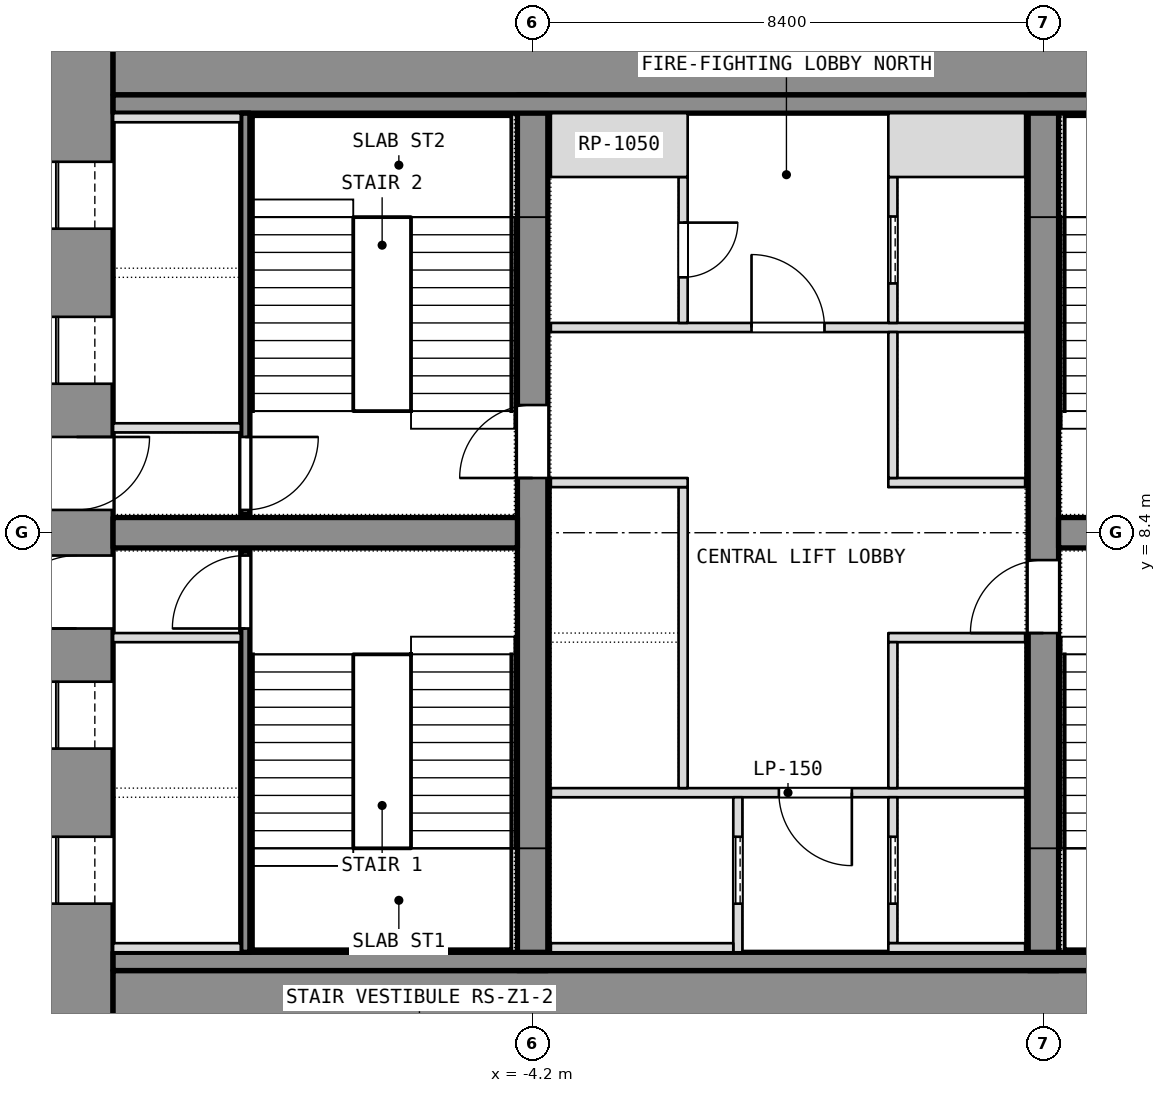
"""IFC4 building model, lengths in metres.
Left out: names, types, materials, properties, quantities, classifications, styles, units other than length and angle.
Written with IfcOpenShell. Run it as: python <this file> out.ifc"""

import sys

from ifc_helpers import new_model, si_unit, direction, frame, frame_2d, origin, place, context, subcontext, project, spatial, rectangle, extrude, element, fill, save


model = new_model("IFC4")
c1 = context("Model", 3, precision=1e-05, world=origin(), true_north=direction((0.0, 1.0)))
c2 = subcontext(c1, "Body", "Model", "MODEL_VIEW")
j1 = project(units=[si_unit("LENGTHUNIT", "METRE"), si_unit("PLANEANGLEUNIT", "RADIAN")], contexts=[c1])
p1 = place(None, origin())
s1 = spatial("IfcSite", under=j1, at=p1, CompositionType="ELEMENT")
p2 = place(p1, origin())
s2 = spatial("IfcBuilding", under=s1, at=p2, CompositionType="ELEMENT")
p3 = place(p2, frame((0.0, 0.0, 79.7)))
s3 = spatial("IfcBuildingStorey", under=s2, at=p3, CompositionType="ELEMENT", Elevation=79.7)
p4 = place(p3, frame((-11.7, 0.0, 0.0), z_axis=(0.0, 0.0, 1.0), x_axis=(0.0, 1.0, 0.0)))
e1 = element("IfcWall", 1, at=p4, inside=s3, PredefinedType="SHEAR", context=c2, shape_type="SweptSolid", body=[
    extrude(rectangle(XDim=16.8, YDim=1.2, at=frame_2d((8.4, 0.0))), origin(), (0.0, 0.0, 1.0), 3.6),
])
p5 = place(p4, frame((2.3, 0.0, 0.0)))
e2 = element("IfcOpeningElement", 2, at=p5, cuts=e1, PredefinedType="OPENING", context=c2, shape_type="SweptSolid", body=[
    extrude(rectangle(XDim=1.1, YDim=2.1, at=frame_2d((0.55, 1.05))), frame((0.0, 0.6, 0.0), z_axis=(0.0, -1.0, 0.0), x_axis=(1.0, 0.0, 0.0)), (0.0, 0.0, 1.0), 1.2),
])
p6 = place(p4, frame((4.85, 0.0, 0.0)))
e3 = element("IfcOpeningElement", 3, at=p6, cuts=e1, PredefinedType="OPENING", context=c2, shape_type="SweptSolid", body=[
    extrude(rectangle(XDim=1.1, YDim=2.1, at=frame_2d((0.55, 1.05))), frame((0.0, 0.6, 0.0), z_axis=(0.0, -1.0, 0.0), x_axis=(1.0, 0.0, 0.0)), (0.0, 0.0, 1.0), 1.2),
])
p7 = place(p4, frame((6.825, 0.0, 0.0)))
e4 = element("IfcOpeningElement", 4, at=p7, cuts=e1, PredefinedType="OPENING", context=c2, shape_type="SweptSolid", body=[
    extrude(rectangle(XDim=1.2, YDim=2.1, at=frame_2d((0.6, 1.05))), frame((0.0, 0.6, 0.0), z_axis=(0.0, -1.0, 0.0), x_axis=(1.0, 0.0, 0.0)), (0.0, 0.0, 1.0), 1.2),
])
p8 = place(p4, frame((13.4, 0.0, 0.0)))
e5 = element("IfcOpeningElement", 5, at=p8, cuts=e1, PredefinedType="OPENING", context=c2, shape_type="SweptSolid", body=[
    extrude(rectangle(XDim=1.1, YDim=2.1, at=frame_2d((0.55, 1.05))), frame((0.0, 0.6, 0.0), z_axis=(0.0, -1.0, 0.0), x_axis=(1.0, 0.0, 0.0)), (0.0, 0.0, 1.0), 1.2),
])
p9 = place(p4, frame((10.85, 0.0, 0.0)))
e6 = element("IfcOpeningElement", 6, at=p9, cuts=e1, PredefinedType="OPENING", context=c2, shape_type="SweptSolid", body=[
    extrude(rectangle(XDim=1.1, YDim=2.1, at=frame_2d((0.55, 1.05))), frame((0.0, 0.6, 0.0), z_axis=(0.0, -1.0, 0.0), x_axis=(1.0, 0.0, 0.0)), (0.0, 0.0, 1.0), 1.2),
])
p10 = place(p4, frame((8.775, 0.0, 0.0)))
e7 = element("IfcOpeningElement", 7, at=p10, cuts=e1, PredefinedType="OPENING", context=c2, shape_type="SweptSolid", body=[
    extrude(rectangle(XDim=1.2, YDim=2.1, at=frame_2d((0.6, 1.05))), frame((0.0, 0.6, 0.0), z_axis=(0.0, -1.0, 0.0), x_axis=(1.0, 0.0, 0.0)), (0.0, 0.0, 1.0), 1.2),
])
for number, where, z_axis, x_axis in (
    (8, (-11.1, 0.6, 0.0), (0.0, 0.0, 1.0), (1.0, 0.0, 0.0)),
    (9, (-11.1, 16.2, 0.0), (0.0, 0.0, 1.0), (1.0, 0.0, 0.0)),
):
    element("IfcWall", number, at=place(p3, frame(where, z_axis=z_axis, x_axis=x_axis)), inside=s3, PredefinedType="SHEAR", context=c2, shape_type="SweptSolid", body=[
        extrude(rectangle(XDim=22.2, YDim=1.2, at=frame_2d((11.1, 0.0))), origin(), (0.0, 0.0, 1.0), 3.6),
    ])
p11 = place(p3, frame((-4.2, 1.2, 0.0), z_axis=(0.0, 0.0, 1.0), x_axis=(0.0, 1.0, 0.0)))
e10 = element("IfcWall", 10, at=p11, inside=s3, PredefinedType="SHEAR", context=c2, shape_type="SweptSolid", body=[
    extrude(rectangle(XDim=14.4, YDim=0.5, at=frame_2d((7.2, 0.0))), origin(), (0.0, 0.0, 1.0), 3.6),
])
p12 = place(p11, frame((8.1, 0.0, 0.0)))
e11 = element("IfcOpeningElement", 11, at=p12, cuts=e10, PredefinedType="OPENING", context=c2, shape_type="SweptSolid", body=[
    extrude(rectangle(XDim=1.2, YDim=2.1, at=frame_2d((0.6, 1.05))), frame((0.0, 0.25, 0.0), z_axis=(0.0, -1.0, 0.0), x_axis=(1.0, 0.0, 0.0)), (0.0, 0.0, 1.0), 0.5),
])
p13 = place(p3, frame((4.2, 1.2, 0.0), z_axis=(0.0, 0.0, 1.0), x_axis=(0.0, 1.0, 0.0)))
e12 = element("IfcWall", 12, at=p13, inside=s3, PredefinedType="SHEAR", context=c2, shape_type="SweptSolid", body=[
    extrude(rectangle(XDim=14.4, YDim=0.5, at=frame_2d((7.2, 0.0))), origin(), (0.0, 0.0, 1.0), 3.6),
])
p14 = place(p13, frame((5.55, 0.0, 0.0)))
e13 = element("IfcOpeningElement", 13, at=p14, cuts=e12, PredefinedType="OPENING", context=c2, shape_type="SweptSolid", body=[
    extrude(rectangle(XDim=1.2, YDim=2.1, at=frame_2d((0.6, 1.05))), frame((0.0, 0.25, 0.0), z_axis=(0.0, -1.0, 0.0), x_axis=(1.0, 0.0, 0.0)), (0.0, 0.0, 1.0), 0.5),
])
for number, where, z_axis, x_axis in (
    (14, (-11.1, 8.4, 0.0), (0.0, 0.0, 1.0), (1.0, 0.0, 0.0)),
    (15, (4.45, 8.4, 0.0), (0.0, 0.0, 1.0), (1.0, 0.0, 0.0)),
):
    element("IfcWall", number, at=place(p3, frame(where, z_axis=z_axis, x_axis=x_axis)), inside=s3, PredefinedType="SHEAR", context=c2, shape_type="SweptSolid", body=[
        extrude(rectangle(XDim=6.65, YDim=0.5, at=frame_2d((3.325, 0.0))), origin(), (0.0, 0.0, 1.0), 3.6),
    ])
for number, where, z_axis, x_axis in (
    (16, (-11.1, 1.35, 0.0), (0.0, 0.0, 1.0), (1.0, 0.0, 0.0)),
    (17, (-11.1, 15.45, 0.0), (0.0, 0.0, 1.0), (1.0, 0.0, 0.0)),
):
    element("IfcWall", number, at=place(p3, frame(where, z_axis=z_axis, x_axis=x_axis)), inside=s3, PredefinedType="PARTITIONING", context=c2, shape_type="SweptSolid", body=[
        extrude(rectangle(XDim=22.2, YDim=0.3, at=frame_2d((11.1, 0.0))), origin(), (0.0, 0.0, 1.0), 3.34),
    ])
p15 = place(p3, frame((-8.925, 1.5, 0.0), z_axis=(0.0, 0.0, 1.0), x_axis=(0.0, 1.0, 0.0)))
e18 = element("IfcWall", 18, at=p15, inside=s3, PredefinedType="SHEAR", context=c2, shape_type="SweptSolid", body=[
    extrude(rectangle(XDim=6.6, YDim=0.15, at=frame_2d((3.3, 0.0))), origin(), (0.0, 0.0, 1.0), 3.34),
])
p16 = place(p15, frame((5.325, 0.0, 0.0)))
e19 = element("IfcOpeningElement", 19, at=p16, cuts=e18, PredefinedType="OPENING", context=c2, shape_type="SweptSolid", body=[
    extrude(rectangle(XDim=1.2, YDim=2.1, at=frame_2d((0.6, 1.05))), frame((0.0, 0.075, 0.0), z_axis=(0.0, -1.0, 0.0), x_axis=(1.0, 0.0, 0.0)), (0.0, 0.0, 1.0), 0.15),
])
for number, where, z_axis, x_axis in (
    (20, (-11.1, 6.675, 0.0), (0.0, 0.0, 1.0), (1.0, 0.0, 0.0)),
    (21, (-11.1, 1.575, 0.0), (0.0, 0.0, 1.0), (1.0, 0.0, 0.0)),
):
    element("IfcWall", number, at=place(p3, frame(where, z_axis=z_axis, x_axis=x_axis)), inside=s3, PredefinedType="SHEAR", context=c2, shape_type="SweptSolid", body=[
        extrude(rectangle(XDim=2.1, YDim=0.15, at=frame_2d((1.05, 0.0))), origin(), (0.0, 0.0, 1.0), 3.6),
    ])
p17 = place(p3, frame((-8.925, 8.7, 0.0), z_axis=(0.0, 0.0, 1.0), x_axis=(0.0, 1.0, 0.0)))
e22 = element("IfcWall", 22, at=p17, inside=s3, PredefinedType="SHEAR", context=c2, shape_type="SweptSolid", body=[
    extrude(rectangle(XDim=6.6, YDim=0.15, at=frame_2d((3.3, 0.0))), origin(), (0.0, 0.0, 1.0), 3.34),
])
p18 = place(p17, frame((0.075, 0.0, 0.0)))
e23 = element("IfcOpeningElement", 23, at=p18, cuts=e22, PredefinedType="OPENING", context=c2, shape_type="SweptSolid", body=[
    extrude(rectangle(XDim=1.2, YDim=2.1, at=frame_2d((0.6, 1.05))), frame((0.0, 0.075, 0.0), z_axis=(0.0, -1.0, 0.0), x_axis=(1.0, 0.0, 0.0)), (0.0, 0.0, 1.0), 0.15),
])
for number, where, z_axis, x_axis in (
    (24, (-11.1, 10.125, 0.0), (0.0, 0.0, 1.0), (1.0, 0.0, 0.0)),
    (25, (-11.1, 15.225, 0.0), (0.0, 0.0, 1.0), (1.0, 0.0, 0.0)),
):
    element("IfcWall", number, at=place(p3, frame(where, z_axis=z_axis, x_axis=x_axis)), inside=s3, PredefinedType="SHEAR", context=c2, shape_type="SweptSolid", body=[
        extrude(rectangle(XDim=2.1, YDim=0.15, at=frame_2d((1.05, 0.0))), origin(), (0.0, 0.0, 1.0), 3.6),
    ])
p19 = place(p3, frame((-3.9, 4.125, 0.0), z_axis=(0.0, 0.0, 1.0), x_axis=(1.0, 0.0, 0.0)))
e26 = element("IfcWall", 26, at=p19, inside=s3, PredefinedType="PARTITIONING", context=c2, shape_type="SweptSolid", body=[
    extrude(rectangle(XDim=7.8, YDim=0.15, at=frame_2d((3.9, 0.0))), origin(), (0.0, 0.0, 1.0), 3.34),
])
p20 = place(p19, frame((3.75, 0.0, 0.0)))
e27 = element("IfcOpeningElement", 27, at=p20, cuts=e26, PredefinedType="OPENING", context=c2, shape_type="SweptSolid", body=[
    extrude(rectangle(XDim=1.2, YDim=2.1, at=frame_2d((0.6, 1.05))), frame((0.0, 0.075, 0.0), z_axis=(0.0, -1.0, 0.0), x_axis=(1.0, 0.0, 0.0)), (0.0, 0.0, 1.0), 0.15),
])
p21 = place(p3, frame((-3.9, 11.775, 0.0), z_axis=(0.0, 0.0, 1.0), x_axis=(1.0, 0.0, 0.0)))
e28 = element("IfcWall", 28, at=p21, inside=s3, PredefinedType="PARTITIONING", context=c2, shape_type="SweptSolid", body=[
    extrude(rectangle(XDim=7.8, YDim=0.15, at=frame_2d((3.9, 0.0))), origin(), (0.0, 0.0, 1.0), 3.34),
])
p22 = place(p21, frame((3.3, 0.0, 0.0)))
e29 = element("IfcOpeningElement", 29, at=p22, cuts=e28, PredefinedType="OPENING", context=c2, shape_type="SweptSolid", body=[
    extrude(rectangle(XDim=1.2, YDim=2.1, at=frame_2d((0.6, 1.05))), frame((0.0, 0.075, 0.0), z_axis=(0.0, -1.0, 0.0), x_axis=(1.0, 0.0, 0.0)), (0.0, 0.0, 1.0), 0.15),
])
p23 = place(p3, frame((-0.825, 1.5, 0.0), z_axis=(0.0, 0.0, 1.0), x_axis=(0.0, 1.0, 0.0)))
e30 = element("IfcWall", 30, at=p23, inside=s3, PredefinedType="SHEAR", context=c2, shape_type="SweptSolid", body=[
    extrude(rectangle(XDim=2.55, YDim=0.15, at=frame_2d((1.275, 0.0))), origin(), (0.0, 0.0, 1.0), 3.6),
])
p24 = place(p23, frame((0.8, 0.0, 0.0)))
e31 = element("IfcOpeningElement", 31, at=p24, cuts=e30, PredefinedType="OPENING", context=c2, shape_type="SweptSolid", body=[
    extrude(rectangle(XDim=1.1, YDim=2.1, at=frame_2d((0.55, 1.05))), frame((0.0, 0.075, 0.0), z_axis=(0.0, -1.0, 0.0), x_axis=(1.0, 0.0, 0.0)), (0.0, 0.0, 1.0), 0.15),
])
p25 = place(p3, frame((-3.9, 1.575, 0.0), z_axis=(0.0, 0.0, 1.0), x_axis=(1.0, 0.0, 0.0)))
e32 = element("IfcWall", 32, at=p25, inside=s3, PredefinedType="SHEAR", context=c2, shape_type="SweptSolid", body=[
    extrude(rectangle(XDim=3.0, YDim=0.15, at=frame_2d((1.5, 0.0))), origin(), (0.0, 0.0, 1.0), 3.6),
])
p26 = place(p3, frame((-1.725, 4.2, 0.0), z_axis=(0.0, 0.0, 1.0), x_axis=(0.0, 1.0, 0.0)))
e33 = element("IfcWall", 33, at=p26, inside=s3, PredefinedType="SHEAR", context=c2, shape_type="SweptSolid", body=[
    extrude(rectangle(XDim=4.95, YDim=0.15, at=frame_2d((2.475, 0.0))), origin(), (0.0, 0.0, 1.0), 3.6),
])
p27 = place(p3, frame((-3.9, 9.225, 0.0), z_axis=(0.0, 0.0, 1.0), x_axis=(1.0, 0.0, 0.0)))
e34 = element("IfcWall", 34, at=p27, inside=s3, PredefinedType="SHEAR", context=c2, shape_type="SweptSolid", body=[
    extrude(rectangle(XDim=2.25, YDim=0.15, at=frame_2d((1.125, 0.0))), origin(), (0.0, 0.0, 1.0), 3.6),
])
p28 = place(p3, frame((-1.725, 11.85, 0.0), z_axis=(0.0, 0.0, 1.0), x_axis=(0.0, 1.0, 0.0)))
e35 = element("IfcWall", 35, at=p28, inside=s3, PredefinedType="PARTITIONING", context=c2, shape_type="SweptSolid", body=[
    extrude(rectangle(XDim=2.4, YDim=0.15, at=frame_2d((1.2, 0.0))), origin(), (0.0, 0.0, 1.0), 3.34),
])
p29 = place(p28, frame((0.75, 0.0, 0.0)))
e36 = element("IfcOpeningElement", 36, at=p29, cuts=e35, PredefinedType="OPENING", context=c2, shape_type="SweptSolid", body=[
    extrude(rectangle(XDim=0.9, YDim=2.1, at=frame_2d((0.45, 1.05))), frame((0.0, 0.075, 0.0), z_axis=(0.0, -1.0, 0.0), x_axis=(1.0, 0.0, 0.0)), (0.0, 0.0, 1.0), 0.15),
])
p30 = place(p3, frame((-3.9, 14.775, 0.0), z_axis=(0.0, 0.0, 1.0), x_axis=(1.0, 0.0, 0.0)))
e37 = element("IfcWall", 37, at=p30, inside=s3, PredefinedType="PARTITIONING", context=c2, shape_type="SweptSolid", body=[
    extrude(rectangle(XDim=2.25, YDim=1.05, at=frame_2d((1.125, 0.0))), origin(), (0.0, 0.0, 1.0), 3.34),
])
p31 = place(p3, frame((1.725, 1.65, 0.0), z_axis=(0.0, 0.0, 1.0), x_axis=(0.0, 1.0, 0.0)))
e38 = element("IfcWall", 38, at=p31, inside=s3, PredefinedType="SHEAR", context=c2, shape_type="SweptSolid", body=[
    extrude(rectangle(XDim=2.4, YDim=0.15, at=frame_2d((1.2, 0.0))), origin(), (0.0, 0.0, 1.0), 3.6),
])
p32 = place(p31, frame((0.65, 0.0, 0.0)))
e39 = element("IfcOpeningElement", 39, at=p32, cuts=e38, PredefinedType="OPENING", context=c2, shape_type="SweptSolid", body=[
    extrude(rectangle(XDim=1.1, YDim=2.1, at=frame_2d((0.55, 1.05))), frame((0.0, 0.075, 0.0), z_axis=(0.0, -1.0, 0.0), x_axis=(1.0, 0.0, 0.0)), (0.0, 0.0, 1.0), 0.15),
])
p33 = place(p3, frame((1.65, 1.575, 0.0), z_axis=(0.0, 0.0, 1.0), x_axis=(1.0, 0.0, 0.0)))
e40 = element("IfcWall", 40, at=p33, inside=s3, PredefinedType="SHEAR", context=c2, shape_type="SweptSolid", body=[
    extrude(rectangle(XDim=2.25, YDim=0.15, at=frame_2d((1.125, 0.0))), origin(), (0.0, 0.0, 1.0), 3.6),
])
p34 = place(p3, frame((1.725, 11.85, 0.0), z_axis=(0.0, 0.0, 1.0), x_axis=(0.0, 1.0, 0.0)))
e41 = element("IfcWall", 41, at=p34, inside=s3, PredefinedType="SHEAR", context=c2, shape_type="SweptSolid", body=[
    extrude(rectangle(XDim=2.4, YDim=0.15, at=frame_2d((1.2, 0.0))), origin(), (0.0, 0.0, 1.0), 3.6),
])
p35 = place(p34, frame((0.65, 0.0, 0.0)))
e42 = element("IfcOpeningElement", 42, at=p35, cuts=e41, PredefinedType="OPENING", context=c2, shape_type="SweptSolid", body=[
    extrude(rectangle(XDim=1.1, YDim=2.1, at=frame_2d((0.55, 1.05))), frame((0.0, 0.075, 0.0), z_axis=(0.0, -1.0, 0.0), x_axis=(1.0, 0.0, 0.0)), (0.0, 0.0, 1.0), 0.15),
])
p36 = place(p3, frame((1.65, 14.775, 0.0), z_axis=(0.0, 0.0, 1.0), x_axis=(1.0, 0.0, 0.0)))
e43 = element("IfcWall", 43, at=p36, inside=s3, PredefinedType="SHEAR", context=c2, shape_type="SweptSolid", body=[
    extrude(rectangle(XDim=2.25, YDim=1.05, at=frame_2d((1.125, 0.0))), origin(), (0.0, 0.0, 1.0), 3.6),
])
for number, where, z_axis, x_axis in (
    (44, (1.65, 6.675, 0.0), (0.0, 0.0, 1.0), (1.0, 0.0, 0.0)),
    (45, (1.65, 9.225, 0.0), (0.0, 0.0, 1.0), (1.0, 0.0, 0.0)),
):
    element("IfcWall", number, at=place(p3, frame(where, z_axis=z_axis, x_axis=x_axis)), inside=s3, PredefinedType="SHEAR", context=c2, shape_type="SweptSolid", body=[
        extrude(rectangle(XDim=2.25, YDim=0.15, at=frame_2d((1.125, 0.0))), origin(), (0.0, 0.0, 1.0), 3.6),
    ])
p37 = place(p3, frame((1.725, 4.2, 0.0), z_axis=(0.0, 0.0, 1.0), x_axis=(0.0, 1.0, 0.0)))
e46 = element("IfcWall", 46, at=p37, inside=s3, PredefinedType="SHEAR", context=c2, shape_type="SweptSolid", body=[
    extrude(rectangle(XDim=2.4, YDim=0.15, at=frame_2d((1.2, 0.0))), origin(), (0.0, 0.0, 1.0), 3.6),
])
p38 = place(p3, frame((1.725, 9.3, 0.0), z_axis=(0.0, 0.0, 1.0), x_axis=(0.0, 1.0, 0.0)))
e47 = element("IfcWall", 47, at=p38, inside=s3, PredefinedType="SHEAR", context=c2, shape_type="SweptSolid", body=[
    extrude(rectangle(XDim=2.4, YDim=0.15, at=frame_2d((1.2, 0.0))), origin(), (0.0, 0.0, 1.0), 3.6),
])
p39 = place(p5, origin())
e48 = element("IfcDoor", 48, at=p39, inside=s3, OperationType="SLIDING_TO_LEFT", PredefinedType="DOOR", context=c2, shape_type="SweptSolid", body=[
    extrude(rectangle(XDim=1.1, YDim=2.1, at=frame_2d((0.55, 1.05))), frame((0.0, 0.025, 0.0), z_axis=(0.0, -1.0, 0.0), x_axis=(1.0, 0.0, 0.0)), (0.0, 0.0, 1.0), 0.05),
])
fill(e2, e48)
p40 = place(p6, origin())
e49 = element("IfcDoor", 49, at=p40, inside=s3, OperationType="SLIDING_TO_LEFT", PredefinedType="DOOR", context=c2, shape_type="SweptSolid", body=[
    extrude(rectangle(XDim=1.1, YDim=2.1, at=frame_2d((0.55, 1.05))), frame((0.0, 0.025, 0.0), z_axis=(0.0, -1.0, 0.0), x_axis=(1.0, 0.0, 0.0)), (0.0, 0.0, 1.0), 0.05),
])
fill(e3, e49)
p41 = place(p7, origin())
e50 = element("IfcDoor", 50, at=p41, inside=s3, OperationType="SINGLE_SWING_LEFT", PredefinedType="DOOR", context=c2, shape_type="SweptSolid", body=[
    extrude(rectangle(XDim=1.2, YDim=2.1, at=frame_2d((0.6, 1.05))), frame((0.0, 0.025, 0.0), z_axis=(0.0, -1.0, 0.0), x_axis=(1.0, 0.0, 0.0)), (0.0, 0.0, 1.0), 0.05),
])
fill(e4, e50)
p42 = place(p16, origin())
e51 = element("IfcDoor", 51, at=p42, inside=s3, OperationType="SINGLE_SWING_LEFT", PredefinedType="DOOR", context=c2, shape_type="SweptSolid", body=[
    extrude(rectangle(XDim=1.2, YDim=2.1, at=frame_2d((0.6, 1.05))), frame((0.0, 0.025, 0.0), z_axis=(0.0, -1.0, 0.0), x_axis=(1.0, 0.0, 0.0)), (0.0, 0.0, 1.0), 0.05),
])
fill(e19, e51)
p43 = place(p8, origin())
e52 = element("IfcDoor", 52, at=p43, inside=s3, OperationType="SLIDING_TO_LEFT", PredefinedType="DOOR", context=c2, shape_type="SweptSolid", body=[
    extrude(rectangle(XDim=1.1, YDim=2.1, at=frame_2d((0.55, 1.05))), frame((0.0, 0.025, 0.0), z_axis=(0.0, -1.0, 0.0), x_axis=(1.0, 0.0, 0.0)), (0.0, 0.0, 1.0), 0.05),
])
fill(e5, e52)
p44 = place(p9, origin())
e53 = element("IfcDoor", 53, at=p44, inside=s3, OperationType="SLIDING_TO_LEFT", PredefinedType="DOOR", context=c2, shape_type="SweptSolid", body=[
    extrude(rectangle(XDim=1.1, YDim=2.1, at=frame_2d((0.55, 1.05))), frame((0.0, 0.025, 0.0), z_axis=(0.0, -1.0, 0.0), x_axis=(1.0, 0.0, 0.0)), (0.0, 0.0, 1.0), 0.05),
])
fill(e6, e53)
p45 = place(p10, origin())
e54 = element("IfcDoor", 54, at=p45, inside=s3, OperationType="SINGLE_SWING_LEFT", PredefinedType="DOOR", context=c2, shape_type="SweptSolid", body=[
    extrude(rectangle(XDim=1.2, YDim=2.1, at=frame_2d((0.6, 1.05))), frame((0.0, 0.025, 0.0), z_axis=(0.0, -1.0, 0.0), x_axis=(1.0, 0.0, 0.0)), (0.0, 0.0, 1.0), 0.05),
])
fill(e7, e54)
p46 = place(p18, origin())
e55 = element("IfcDoor", 55, at=p46, inside=s3, OperationType="SINGLE_SWING_LEFT", PredefinedType="DOOR", context=c2, shape_type="SweptSolid", body=[
    extrude(rectangle(XDim=1.2, YDim=2.1, at=frame_2d((0.6, 1.05))), frame((0.0, 0.025, 0.0), z_axis=(0.0, -1.0, 0.0), x_axis=(1.0, 0.0, 0.0)), (0.0, 0.0, 1.0), 0.05),
])
fill(e23, e55)
p47 = place(p24, origin())
e56 = element("IfcDoor", 56, at=p47, inside=s3, OperationType="SLIDING_TO_LEFT", PredefinedType="DOOR", context=c2, shape_type="SweptSolid", body=[
    extrude(rectangle(XDim=1.1, YDim=2.1, at=frame_2d((0.55, 1.05))), frame((0.0, 0.025, 0.0), z_axis=(0.0, -1.0, 0.0), x_axis=(1.0, 0.0, 0.0)), (0.0, 0.0, 1.0), 0.05),
])
fill(e31, e56)
p48 = place(p32, origin())
e57 = element("IfcDoor", 57, at=p48, inside=s3, OperationType="SLIDING_TO_LEFT", PredefinedType="DOOR", context=c2, shape_type="SweptSolid", body=[
    extrude(rectangle(XDim=1.1, YDim=2.1, at=frame_2d((0.55, 1.05))), frame((0.0, 0.025, 0.0), z_axis=(0.0, -1.0, 0.0), x_axis=(1.0, 0.0, 0.0)), (0.0, 0.0, 1.0), 0.05),
])
fill(e39, e57)
p49 = place(p35, origin())
e58 = element("IfcDoor", 58, at=p49, inside=s3, OperationType="SLIDING_TO_LEFT", PredefinedType="DOOR", context=c2, shape_type="SweptSolid", body=[
    extrude(rectangle(XDim=1.1, YDim=2.1, at=frame_2d((0.55, 1.05))), frame((0.0, 0.025, 0.0), z_axis=(0.0, -1.0, 0.0), x_axis=(1.0, 0.0, 0.0)), (0.0, 0.0, 1.0), 0.05),
])
fill(e42, e58)
p50 = place(p20, origin())
e59 = element("IfcDoor", 59, at=p50, inside=s3, OperationType="SINGLE_SWING_LEFT", PredefinedType="DOOR", context=c2, shape_type="SweptSolid", body=[
    extrude(rectangle(XDim=1.2, YDim=2.1, at=frame_2d((0.6, 1.05))), frame((0.0, 0.025, 0.0), z_axis=(0.0, -1.0, 0.0), x_axis=(1.0, 0.0, 0.0)), (0.0, 0.0, 1.0), 0.05),
])
fill(e27, e59)
p51 = place(p22, origin())
e60 = element("IfcDoor", 60, at=p51, inside=s3, OperationType="SINGLE_SWING_LEFT", PredefinedType="DOOR", context=c2, shape_type="SweptSolid", body=[
    extrude(rectangle(XDim=1.2, YDim=2.1, at=frame_2d((0.6, 1.05))), frame((0.0, 0.025, 0.0), z_axis=(0.0, -1.0, 0.0), x_axis=(1.0, 0.0, 0.0)), (0.0, 0.0, 1.0), 0.05),
])
fill(e29, e60)
p52 = place(p29, origin())
e61 = element("IfcDoor", 61, at=p52, inside=s3, OperationType="SINGLE_SWING_LEFT", PredefinedType="DOOR", context=c2, shape_type="SweptSolid", body=[
    extrude(rectangle(XDim=0.9, YDim=2.1, at=frame_2d((0.45, 1.05))), frame((0.0, 0.025, 0.0), z_axis=(0.0, -1.0, 0.0), x_axis=(1.0, 0.0, 0.0)), (0.0, 0.0, 1.0), 0.05),
])
fill(e36, e61)
p53 = place(p12, origin())
e62 = element("IfcDoor", 62, at=p53, inside=s3, OperationType="SINGLE_SWING_LEFT", PredefinedType="DOOR", context=c2, shape_type="SweptSolid", body=[
    extrude(rectangle(XDim=1.2, YDim=2.1, at=frame_2d((0.6, 1.05))), frame((0.0, 0.025, 0.0), z_axis=(0.0, -1.0, 0.0), x_axis=(1.0, 0.0, 0.0)), (0.0, 0.0, 1.0), 0.05),
])
fill(e11, e62)
p54 = place(p14, origin())
e63 = element("IfcDoor", 63, at=p54, inside=s3, OperationType="SINGLE_SWING_LEFT", PredefinedType="DOOR", context=c2, shape_type="SweptSolid", body=[
    extrude(rectangle(XDim=1.2, YDim=2.1, at=frame_2d((0.6, 1.05))), frame((0.0, 0.025, 0.0), z_axis=(0.0, -1.0, 0.0), x_axis=(1.0, 0.0, 0.0)), (0.0, 0.0, 1.0), 0.05),
])
fill(e13, e63)
save(model, sys.argv[1])
